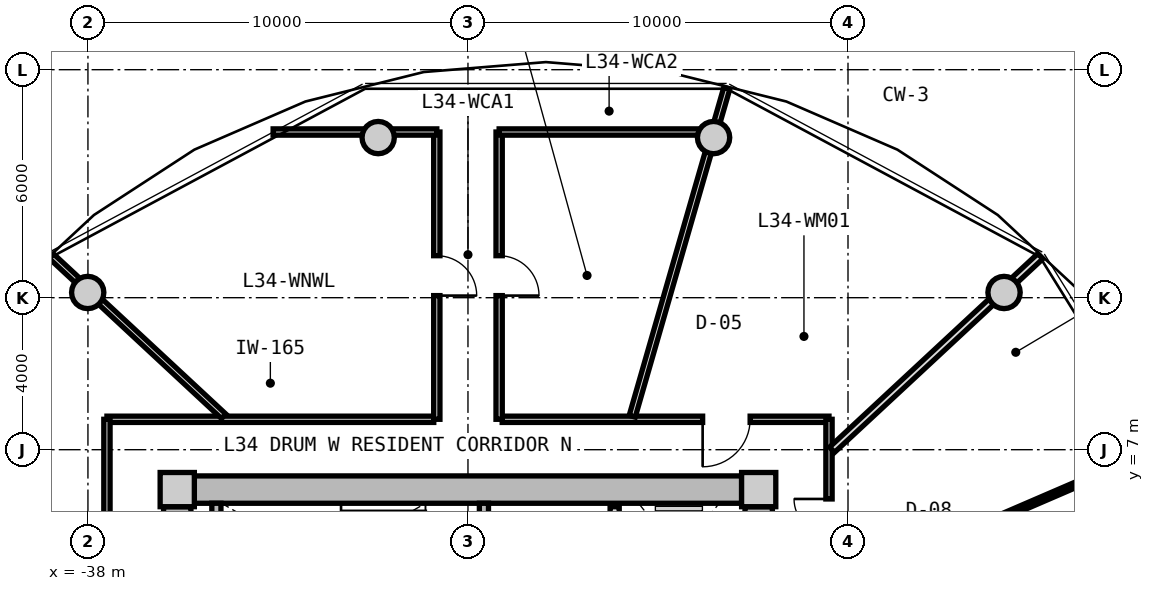
"""IFC4 building model, lengths in metres.
Left out: names, types, materials, properties, quantities, classifications, styles, units other than length and angle.
Written with IfcOpenShell. Run it as: python <this file> out.ifc"""

import sys

from ifc_helpers import new_model, si_unit, direction, frame, frame_2d, origin, origin_2d, place, context, subcontext, project, spatial, rectangle, circle, extrude, source, transform, mapped, element, fill, save


model = new_model("IFC4")
c1 = context("Model", 3, precision=1e-05, world=origin(), true_north=direction((0.0, 1.0)))
c2 = subcontext(c1, "Body", "Model", "MODEL_VIEW")
j1 = project(units=[si_unit("LENGTHUNIT", "METRE"), si_unit("PLANEANGLEUNIT", "RADIAN")], contexts=[c1])
p1 = place(None, origin())
s1 = spatial("IfcSite", under=j1, at=p1, CompositionType="ELEMENT")
p2 = place(p1, origin())
s2 = spatial("IfcBuilding", under=s1, at=p2, CompositionType="ELEMENT")
p3 = place(p2, frame((0.0, 0.0, 111.5)))
s3 = spatial("IfcBuildingStorey", under=s2, at=p3, CompositionType="ELEMENT", Elevation=111.5)
m1 = source(origin(), c2, "Body", "SweptSolid", [
    extrude(rectangle(XDim=0.9, YDim=0.9, at=origin_2d()), origin(), (0.0, 0.0, 1.0), 3.05),
])
for number, where, z_axis, x_axis in (
    (1, (-20.35, 5.95, 0.0), (0.0, 0.0, 1.0), (1.0, 0.0, 0.0)),
    (2, (-35.65, 5.95, 0.0), (0.0, 0.0, 1.0), (1.0, 0.0, 0.0)),
):
    element("IfcColumn", number, at=place(p3, frame(where, z_axis=z_axis, x_axis=x_axis)), inside=s3, PredefinedType="COLUMN", context=c2, shape_type="MappedRepresentation", body=[
        mapped(m1, transform((0.0, 0.0, 0.0), x_axis=(1.0, 0.0, 0.0), y_axis=(0.0, 1.0, 0.0), z_axis=(0.0, 0.0, 1.0), scale=1.0)),
    ])
m2 = source(origin(), c2, "Body", "SweptSolid", [
    extrude(rectangle(XDim=14.4, YDim=0.72, at=frame_2d((7.2, 0.0))), origin(), (0.0, 0.0, 1.0), 2.79),
])
p4 = place(p3, frame((-35.2, 5.95, 0.0), z_axis=(0.0, 0.0, 1.0), x_axis=(1.0, 0.0, 0.0)))
e3 = element("IfcWall", 3, at=p4, inside=s3, PredefinedType="SHEAR", context=c2, shape_type="MappedRepresentation", body=[
    mapped(m2, transform((0.0, 0.0, 0.0), x_axis=(1.0, 0.0, 0.0), y_axis=(0.0, 1.0, 0.0), z_axis=(0.0, 0.0, 1.0), scale=1.0)),
])
m3 = source(origin(), c2, "Body", "SweptSolid", [
    extrude(rectangle(XDim=11.0, YDim=0.72, at=frame_2d((5.5, 0.0))), origin(), (0.0, 0.0, 1.0), 2.79),
])
p5 = place(p3, frame((-35.65, -5.5, 0.0), z_axis=(0.0, 0.0, 1.0), x_axis=(0.0, 1.0, 0.0)))
e4 = element("IfcWall", 4, at=p5, inside=s3, PredefinedType="SHEAR", context=c2, shape_type="MappedRepresentation", body=[
    mapped(m3, transform((0.0, 0.0, 0.0), x_axis=(1.0, 0.0, 0.0), y_axis=(0.0, 1.0, 0.0), z_axis=(0.0, 0.0, 1.0), scale=1.0)),
])
p6 = place(p5, frame((3.8, 0.0, 0.0)))
e5 = element("IfcOpeningElement", 5, at=p6, cuts=e4, PredefinedType="OPENING", context=c2, shape_type="SweptSolid", body=[
    extrude(rectangle(XDim=1.2, YDim=2.15, at=frame_2d((0.6, 1.075))), frame((0.0, 0.37, 0.0), z_axis=(0.0, -1.0, 0.0), x_axis=(1.0, 0.0, 0.0)), (0.0, 0.0, 1.0), 0.74),
])
p7 = place(p3, frame((-20.35, 5.5, 0.0), z_axis=(0.0, 0.0, 1.0), x_axis=(0.0, -1.0, 0.0)))
e6 = element("IfcWall", 6, at=p7, inside=s3, PredefinedType="SHEAR", context=c2, shape_type="MappedRepresentation", body=[
    mapped(m3, transform((0.0, 0.0, 0.0), x_axis=(1.0, 0.0, 0.0), y_axis=(0.0, 1.0, 0.0), z_axis=(0.0, 0.0, 1.0), scale=1.0)),
])
p8 = place(p7, frame((5.65, 0.0, 0.0)))
e7 = element("IfcOpeningElement", 7, at=p8, cuts=e6, PredefinedType="OPENING", context=c2, shape_type="SweptSolid", body=[
    extrude(rectangle(XDim=1.2, YDim=2.15, at=frame_2d((0.6, 1.075))), frame((0.0, 0.37, 0.0), z_axis=(0.0, -1.0, 0.0), x_axis=(1.0, 0.0, 0.0)), (0.0, 0.0, 1.0), 0.74),
])
p9 = place(p7, frame((9.3, 0.0, 0.0)))
e8 = element("IfcOpeningElement", 8, at=p9, cuts=e6, PredefinedType="OPENING", context=c2, shape_type="SweptSolid", body=[
    extrude(rectangle(XDim=1.0, YDim=2.1, at=frame_2d((0.5, 1.05))), frame((0.0, 0.37, 0.0), z_axis=(0.0, -1.0, 0.0), x_axis=(1.0, 0.0, 0.0)), (0.0, 0.0, 1.0), 0.74),
])
m4 = source(origin(), c2, "Body", "SweptSolid", [
    extrude(circle(Radius=0.425, at=origin_2d()), origin(), (0.0, 0.0, 1.0), 3.05),
])
for number, where, z_axis, x_axis in (
    (9, (-13.894, 11.137, 0.0), (0.0, 0.0, 1.0), (1.0, 0.0, 0.0)),
    (10, (-21.537, 15.213, 0.0), (0.0, 0.0, 1.0), (1.0, 0.0, 0.0)),
    (11, (-30.363, 15.213, 0.0), (0.0, 0.0, 1.0), (1.0, 0.0, 0.0)),
    (12, (-38.006, 11.137, 0.0), (0.0, 0.0, 1.0), (1.0, 0.0, 0.0)),
):
    element("IfcColumn", number, at=place(p3, frame(where, z_axis=z_axis, x_axis=x_axis)), inside=s3, PredefinedType="COLUMN", context=c2, shape_type="MappedRepresentation", body=[
        mapped(m4, transform((0.0, 0.0, 0.0), x_axis=(1.0, 0.0, 0.0), y_axis=(0.0, 1.0, 0.0), z_axis=(0.0, 0.0, 1.0), scale=1.0)),
    ])
m5 = source(origin(), c2, "Body", "SweptSolid", [
    extrude(rectangle(XDim=3.14, YDim=0.24, at=frame_2d((1.57, 0.0))), origin(), (0.0, 0.0, 1.0), 2.79),
])
p10 = place(p3, frame((-34.62, 2.45, 0.0), z_axis=(0.0, 0.0, 1.0), x_axis=(0.0, 1.0, 0.0)))
e13 = element("IfcWall", 13, at=p10, inside=s3, PredefinedType="PARTITIONING", context=c2, shape_type="MappedRepresentation", body=[
    mapped(m5, transform((0.0, 0.0, 0.0), x_axis=(1.0, 0.0, 0.0), y_axis=(0.0, 1.0, 0.0), z_axis=(0.0, 0.0, 1.0), scale=1.0)),
])
p11 = place(p3, frame((-27.58, 2.45, 0.0), z_axis=(0.0, 0.0, 1.0), x_axis=(0.0, 1.0, 0.0)))
e14 = element("IfcWall", 14, at=p11, inside=s3, PredefinedType="PARTITIONING", context=c2, shape_type="MappedRepresentation", body=[
    mapped(m5, transform((0.0, 0.0, 0.0), x_axis=(1.0, 0.0, 0.0), y_axis=(0.0, 1.0, 0.0), z_axis=(0.0, 0.0, 1.0), scale=1.0)),
])
p12 = place(p11, frame((0.55, 0.0, 0.0)))
e15 = element("IfcOpeningElement", 15, at=p12, cuts=e14, PredefinedType="OPENING", context=c2, shape_type="SweptSolid", body=[
    extrude(rectangle(XDim=1.1, YDim=2.15, at=frame_2d((0.55, 1.075))), frame((0.0, 0.13, 0.0), z_axis=(0.0, -1.0, 0.0), x_axis=(1.0, 0.0, 0.0)), (0.0, 0.0, 1.0), 0.26),
])
m6 = source(origin(), c2, "Body", "SweptSolid", [
    extrude(rectangle(XDim=5.0, YDim=0.24, at=frame_2d((2.5, 0.0))), origin(), (0.0, 0.0, 1.0), 2.775),
])
p13 = place(p3, frame((-24.14, 0.5, 0.0), z_axis=(0.0, 0.0, 1.0), x_axis=(0.0, 1.0, 0.0)))
e16 = element("IfcWall", 16, at=p13, inside=s3, PredefinedType="PARTITIONING", context=c2, shape_type="MappedRepresentation", body=[
    mapped(m6, transform((0.0, 0.0, 0.0), x_axis=(1.0, 0.0, 0.0), y_axis=(0.0, 1.0, 0.0), z_axis=(0.0, 0.0, 1.0), scale=1.0)),
])
p14 = place(p13, frame((3.05, 0.0, 0.0)))
e17 = element("IfcOpeningElement", 17, at=p14, cuts=e16, PredefinedType="OPENING", context=c2, shape_type="SweptSolid", body=[
    extrude(rectangle(XDim=1.3, YDim=2.2, at=frame_2d((0.65, 1.1))), frame((0.0, 0.13, 0.0), z_axis=(0.0, -1.0, 0.0), x_axis=(1.0, 0.0, 0.0)), (0.0, 0.0, 1.0), 0.26),
])
p15 = place(p13, frame((0.55, 0.0, 0.0)))
e18 = element("IfcOpeningElement", 18, at=p15, cuts=e16, PredefinedType="OPENING", context=c2, shape_type="SweptSolid", body=[
    extrude(rectangle(XDim=1.3, YDim=2.2, at=frame_2d((0.65, 1.1))), frame((0.0, 0.13, 0.0), z_axis=(0.0, -1.0, 0.0), x_axis=(1.0, 0.0, 0.0)), (0.0, 0.0, 1.0), 0.26),
])
m7 = source(origin(), c2, "Body", "SweptSolid", [
    extrude(rectangle(XDim=8.6, YDim=0.165, at=frame_2d((4.3, 0.0))), origin(), (0.0, 0.0, 1.0), 2.775),
])
p16 = place(p3, frame((-37.5, 7.8, 0.0), z_axis=(0.0, 0.0, 1.0), x_axis=(1.0, 0.0, 0.0)))
e19 = element("IfcWall", 19, at=p16, inside=s3, PredefinedType="PARTITIONING", context=c2, shape_type="MappedRepresentation", body=[
    mapped(m7, transform((0.0, 0.0, 0.0), x_axis=(1.0, 0.0, 0.0), y_axis=(0.0, 1.0, 0.0), z_axis=(0.0, 0.0, 1.0), scale=1.0)),
])
p17 = place(p3, frame((-27.1, 7.8, 0.0), z_axis=(0.0, 0.0, 1.0), x_axis=(1.0, 0.0, 0.0)))
e20 = element("IfcWall", 20, at=p17, inside=s3, PredefinedType="PARTITIONING", context=c2, shape_type="MappedRepresentation", body=[
    mapped(m7, transform((0.0, 0.0, 0.0), x_axis=(1.0, 0.0, 0.0), y_axis=(0.0, 1.0, 0.0), z_axis=(0.0, 0.0, 1.0), scale=1.0)),
])
p18 = place(p17, frame((5.275, 0.0, 0.0)))
e21 = element("IfcOpeningElement", 21, at=p18, cuts=e20, PredefinedType="OPENING", context=c2, shape_type="SweptSolid", body=[
    extrude(rectangle(XDim=1.25, YDim=2.2, at=frame_2d((0.625, 1.1))), frame((0.0, 0.093, 0.0), z_axis=(0.0, -1.0, 0.0), x_axis=(1.0, 0.0, 0.0)), (0.0, 0.0, 1.0), 0.185),
])
m8 = source(origin(), c2, "Body", "SweptSolid", [
    extrude(rectangle(XDim=15.6, YDim=0.165, at=frame_2d((7.8, 0.0))), origin(), (0.0, 0.0, 1.0), 2.775),
])
p19 = place(p3, frame((-37.5, -7.8, 0.0), z_axis=(0.0, 0.0, 1.0), x_axis=(0.0, 1.0, 0.0)))
e22 = element("IfcWall", 22, at=p19, inside=s3, PredefinedType="PARTITIONING", context=c2, shape_type="MappedRepresentation", body=[
    mapped(m8, transform((0.0, 0.0, 0.0), x_axis=(1.0, 0.0, 0.0), y_axis=(0.0, 1.0, 0.0), z_axis=(0.0, 0.0, 1.0), scale=1.0)),
])
p20 = place(p19, frame((7.175, 0.0, 0.0)))
e23 = element("IfcOpeningElement", 23, at=p20, cuts=e22, PredefinedType="OPENING", context=c2, shape_type="SweptSolid", body=[
    extrude(rectangle(XDim=1.25, YDim=2.2, at=frame_2d((0.625, 1.1))), frame((0.0, 0.093, 0.0), z_axis=(0.0, -1.0, 0.0), x_axis=(1.0, 0.0, 0.0)), (0.0, 0.0, 1.0), 0.185),
])
p21 = place(p3, frame((-18.5, 7.8, 0.0), z_axis=(0.0, 0.0, 1.0), x_axis=(0.0, -1.0, 0.0)))
e24 = element("IfcWall", 24, at=p21, inside=s3, PredefinedType="PARTITIONING", context=c2, shape_type="MappedRepresentation", body=[
    mapped(m8, transform((0.0, 0.0, 0.0), x_axis=(1.0, 0.0, 0.0), y_axis=(0.0, 1.0, 0.0), z_axis=(0.0, 0.0, 1.0), scale=1.0)),
])
p22 = place(p21, frame((12.002, 0.0, 0.0)))
e25 = element("IfcOpeningElement", 25, at=p22, cuts=e24, PredefinedType="OPENING", context=c2, shape_type="SweptSolid", body=[
    extrude(rectangle(XDim=1.05, YDim=2.15, at=frame_2d((0.525, 1.075))), frame((0.0, 0.093, 0.0), z_axis=(0.0, -1.0, 0.0), x_axis=(1.0, 0.0, 0.0)), (0.0, 0.0, 1.0), 0.185),
])
p23 = place(p21, frame((10.211, 0.0, 0.0)))
e26 = element("IfcOpeningElement", 26, at=p23, cuts=e24, PredefinedType="OPENING", context=c2, shape_type="SweptSolid", body=[
    extrude(rectangle(XDim=1.05, YDim=2.15, at=frame_2d((0.525, 1.075))), frame((0.0, 0.093, 0.0), z_axis=(0.0, -1.0, 0.0), x_axis=(1.0, 0.0, 0.0)), (0.0, 0.0, 1.0), 0.185),
])
p24 = place(p21, frame((8.212, 0.0, 0.0)))
e27 = element("IfcOpeningElement", 27, at=p24, cuts=e24, PredefinedType="OPENING", context=c2, shape_type="SweptSolid", body=[
    extrude(rectangle(XDim=1.05, YDim=2.15, at=frame_2d((0.525, 1.075))), frame((0.0, 0.093, 0.0), z_axis=(0.0, -1.0, 0.0), x_axis=(1.0, 0.0, 0.0)), (0.0, 0.0, 1.0), 0.185),
])
p25 = place(p21, frame((6.291, 0.0, 0.0)))
e28 = element("IfcOpeningElement", 28, at=p25, cuts=e24, PredefinedType="OPENING", context=c2, shape_type="SweptSolid", body=[
    extrude(rectangle(XDim=1.05, YDim=2.15, at=frame_2d((0.525, 1.075))), frame((0.0, 0.093, 0.0), z_axis=(0.0, -1.0, 0.0), x_axis=(1.0, 0.0, 0.0)), (0.0, 0.0, 1.0), 0.185),
])
p26 = place(p21, frame((4.739, 0.0, 0.0)))
e29 = element("IfcOpeningElement", 29, at=p26, cuts=e24, PredefinedType="OPENING", context=c2, shape_type="SweptSolid", body=[
    extrude(rectangle(XDim=0.92, YDim=2.1, at=frame_2d((0.46, 1.05))), frame((0.0, 0.093, 0.0), z_axis=(0.0, -1.0, 0.0), x_axis=(1.0, 0.0, 0.0)), (0.0, 0.0, 1.0), 0.185),
])
p27 = place(p21, frame((2.096, 0.0, 0.0)))
e30 = element("IfcOpeningElement", 30, at=p27, cuts=e24, PredefinedType="OPENING", context=c2, shape_type="SweptSolid", body=[
    extrude(rectangle(XDim=0.92, YDim=2.1, at=frame_2d((0.46, 1.05))), frame((0.0, 0.093, 0.0), z_axis=(0.0, -1.0, 0.0), x_axis=(1.0, 0.0, 0.0)), (0.0, 0.0, 1.0), 0.185),
])
m9 = source(origin(), c2, "Body", "SweptSolid", [
    extrude(rectangle(XDim=8.989, YDim=0.165, at=frame_2d((4.495, 0.0))), origin(), (0.0, 0.0, 1.0), 2.275),
])
p28 = place(p3, frame((-23.678, 7.88, 0.0), z_axis=(0.0, 0.0, 1.0), x_axis=(0.27702323008, 0.960863221274, 0.0)))
e31 = element("IfcWall", 31, at=p28, inside=s3, PredefinedType="PARTITIONING", context=c2, shape_type="MappedRepresentation", body=[
    mapped(m9, transform((0.0, 0.0, 0.0), x_axis=(1.0, 0.0, 0.0), y_axis=(0.0, 1.0, 0.0), z_axis=(0.0, 0.0, 1.0), scale=1.0)),
])
m10 = source(origin(), c2, "Body", "SweptSolid", [
    extrude(rectangle(XDim=6.187, YDim=0.165, at=frame_2d((3.093, 0.0))), origin(), (0.0, 0.0, 1.0), 2.275),
])
p29 = place(p3, frame((-34.429, 7.88, 0.0), z_axis=(0.0, 0.0, 1.0), x_axis=(-0.732501077882, 0.680765870841, 0.0)))
e32 = element("IfcWall", 32, at=p29, inside=s3, PredefinedType="PARTITIONING", context=c2, shape_type="MappedRepresentation", body=[
    mapped(m10, transform((0.0, 0.0, 0.0), x_axis=(1.0, 0.0, 0.0), y_axis=(0.0, 1.0, 0.0), z_axis=(0.0, 0.0, 1.0), scale=1.0)),
])
m11 = source(origin(), c2, "Body", "SweptSolid", [
    extrude(rectangle(XDim=7.56, YDim=0.165, at=frame_2d((3.78, 0.0))), origin(), (0.0, 0.0, 1.0), 2.775),
])
p30 = place(p3, frame((-28.82, 7.8, 0.0), z_axis=(0.0, 0.0, 1.0), x_axis=(0.0, 1.0, 0.0)))
e33 = element("IfcWall", 33, at=p30, inside=s3, PredefinedType="PARTITIONING", context=c2, shape_type="MappedRepresentation", body=[
    mapped(m11, transform((0.0, 0.0, 0.0), x_axis=(1.0, 0.0, 0.0), y_axis=(0.0, 1.0, 0.0), z_axis=(0.0, 0.0, 1.0), scale=1.0)),
])
p31 = place(p30, frame((3.255, 0.0, 0.0)))
e34 = element("IfcOpeningElement", 34, at=p31, cuts=e33, PredefinedType="OPENING", context=c2, shape_type="SweptSolid", body=[
    extrude(rectangle(XDim=1.05, YDim=2.15, at=frame_2d((0.525, 1.075))), frame((0.0, 0.093, 0.0), z_axis=(0.0, -1.0, 0.0), x_axis=(1.0, 0.0, 0.0)), (0.0, 0.0, 1.0), 0.185),
])
m12 = source(origin(), c2, "Body", "SweptSolid", [
    extrude(rectangle(XDim=4.307, YDim=0.165, at=frame_2d((2.153, 0.0))), origin(), (0.0, 0.0, 1.0), 2.275),
])
p32 = place(p3, frame((-33.127, 15.36, 0.0), z_axis=(0.0, 0.0, 1.0), x_axis=(1.0, 0.0, 0.0)))
e35 = element("IfcWall", 35, at=p32, inside=s3, PredefinedType="PARTITIONING", context=c2, shape_type="MappedRepresentation", body=[
    mapped(m12, transform((0.0, 0.0, 0.0), x_axis=(1.0, 0.0, 0.0), y_axis=(0.0, 1.0, 0.0), z_axis=(0.0, 0.0, 1.0), scale=1.0)),
])
p33 = place(p3, frame((-27.18, 7.8, 0.0), z_axis=(0.0, 0.0, 1.0), x_axis=(0.0, 1.0, 0.0)))
e36 = element("IfcWall", 36, at=p33, inside=s3, PredefinedType="PARTITIONING", context=c2, shape_type="MappedRepresentation", body=[
    mapped(m11, transform((0.0, 0.0, 0.0), x_axis=(1.0, 0.0, 0.0), y_axis=(0.0, 1.0, 0.0), z_axis=(0.0, 0.0, 1.0), scale=1.0)),
])
p34 = place(p33, frame((3.255, 0.0, 0.0)))
e37 = element("IfcOpeningElement", 37, at=p34, cuts=e36, PredefinedType="OPENING", context=c2, shape_type="SweptSolid", body=[
    extrude(rectangle(XDim=1.05, YDim=2.15, at=frame_2d((0.525, 1.075))), frame((0.0, 0.093, 0.0), z_axis=(0.0, -1.0, 0.0), x_axis=(1.0, 0.0, 0.0)), (0.0, 0.0, 1.0), 0.185),
])
m13 = source(origin(), c2, "Body", "SweptSolid", [
    extrude(rectangle(XDim=5.814, YDim=0.165, at=frame_2d((2.907, 0.0))), origin(), (0.0, 0.0, 1.0), 2.275),
])
p35 = place(p3, frame((-27.18, 15.36, 0.0), z_axis=(0.0, 0.0, 1.0), x_axis=(1.0, 0.0, 0.0)))
e38 = element("IfcWall", 38, at=p35, inside=s3, PredefinedType="PARTITIONING", context=c2, shape_type="MappedRepresentation", body=[
    mapped(m13, transform((0.0, 0.0, 0.0), x_axis=(1.0, 0.0, 0.0), y_axis=(0.0, 1.0, 0.0), z_axis=(0.0, 0.0, 1.0), scale=1.0)),
])
m14 = source(origin(), c2, "Body", "SweptSolid", [
    extrude(rectangle(XDim=7.482, YDim=0.19, at=frame_2d((3.741, 0.0))), origin(), (0.0, 0.0, 1.0), 2.275),
])
p36 = place(p3, frame((-18.42, 6.998, 0.0), z_axis=(0.0, 0.0, 1.0), x_axis=(0.732508698043, 0.680757671489, 0.0)))
e39 = element("IfcWall", 39, at=p36, inside=s3, PredefinedType="PARTITIONING", context=c2, shape_type="MappedRepresentation", body=[
    mapped(m14, transform((0.0, 0.0, 0.0), x_axis=(1.0, 0.0, 0.0), y_axis=(0.0, 1.0, 0.0), z_axis=(0.0, 0.0, 1.0), scale=1.0)),
])
m15 = source(origin(), c2, "Body", "SweptSolid", [
    extrude(rectangle(XDim=9.447, YDim=0.14, at=frame_2d((4.724, 0.0))), origin(), (0.0, 0.0, 1.0), 2.775),
])
p37 = place(p3, frame((-18.47, 3.289, 0.0), z_axis=(0.0, 0.0, 1.0), x_axis=(0.918162367414, 0.396204324894, 0.0)))
e40 = element("IfcWall", 40, at=p37, inside=s3, PredefinedType="PARTITIONING", context=c2, shape_type="MappedRepresentation", body=[
    mapped(m15, transform((0.0, 0.0, 0.0), x_axis=(1.0, 0.0, 0.0), y_axis=(0.0, 1.0, 0.0), z_axis=(0.0, 0.0, 1.0), scale=1.0)),
])
m16 = source(origin(), c2, "Body", "SweptSolid", [
    extrude(rectangle(XDim=1.05, YDim=2.15, at=frame_2d((0.525, 1.075))), frame((0.0, 0.025, 0.0), z_axis=(0.0, -1.0, 0.0), x_axis=(1.0, 0.0, 0.0)), (0.0, 0.0, 1.0), 0.05),
])
p38 = place(p31, frame((1.05, 0.0, 0.0), z_axis=(0.0, 0.0, 1.0), x_axis=(-1.0, 0.0, 0.0)))
e41 = element("IfcDoor", 41, at=p38, inside=s3, OperationType="SINGLE_SWING_RIGHT", PredefinedType="DOOR", context=c2, shape_type="MappedRepresentation", body=[
    mapped(m16, transform((0.0, 0.0, 0.0), x_axis=(1.0, 0.0, 0.0), y_axis=(0.0, 1.0, 0.0), z_axis=(0.0, 0.0, 1.0), scale=1.0)),
])
fill(e34, e41)
p39 = place(p34, frame((1.05, 0.0, 0.0), z_axis=(0.0, 0.0, 1.0), x_axis=(-1.0, 0.0, 0.0)))
e42 = element("IfcDoor", 42, at=p39, inside=s3, OperationType="SINGLE_SWING_RIGHT", PredefinedType="DOOR", context=c2, shape_type="MappedRepresentation", body=[
    mapped(m16, transform((0.0, 0.0, 0.0), x_axis=(1.0, 0.0, 0.0), y_axis=(0.0, 1.0, 0.0), z_axis=(0.0, 0.0, 1.0), scale=1.0)),
])
fill(e37, e42)
m17 = source(origin(), c2, "Body", "SweptSolid", [
    extrude(rectangle(XDim=0.92, YDim=2.1, at=frame_2d((0.46, 1.05))), frame((0.0, 0.025, 0.0), z_axis=(0.0, -1.0, 0.0), x_axis=(1.0, 0.0, 0.0)), (0.0, 0.0, 1.0), 0.05),
])
p40 = place(p27, frame((0.92, 0.0, 0.0), z_axis=(0.0, 0.0, 1.0), x_axis=(-1.0, 0.0, 0.0)))
e43 = element("IfcDoor", 43, at=p40, inside=s3, OperationType="SINGLE_SWING_RIGHT", PredefinedType="DOOR", context=c2, shape_type="MappedRepresentation", body=[
    mapped(m17, transform((0.0, 0.0, 0.0), x_axis=(1.0, 0.0, 0.0), y_axis=(0.0, 1.0, 0.0), z_axis=(0.0, 0.0, 1.0), scale=1.0)),
])
fill(e30, e43)
m18 = source(origin(), c2, "Body", "SweptSolid", [
    extrude(rectangle(XDim=1.25, YDim=2.2, at=frame_2d((0.625, 1.1))), frame((0.0, 0.025, 0.0), z_axis=(0.0, -1.0, 0.0), x_axis=(1.0, 0.0, 0.0)), (0.0, 0.0, 1.0), 0.05),
])
p41 = place(p18, frame((1.25, 0.0, 0.0), z_axis=(0.0, 0.0, 1.0), x_axis=(-1.0, 0.0, 0.0)))
e44 = element("IfcDoor", 44, at=p41, inside=s3, OperationType="SINGLE_SWING_RIGHT", PredefinedType="DOOR", context=c2, shape_type="MappedRepresentation", body=[
    mapped(m18, transform((0.0, 0.0, 0.0), x_axis=(1.0, 0.0, 0.0), y_axis=(0.0, 1.0, 0.0), z_axis=(0.0, 0.0, 1.0), scale=1.0)),
])
fill(e21, e44)
save(model, sys.argv[1])
